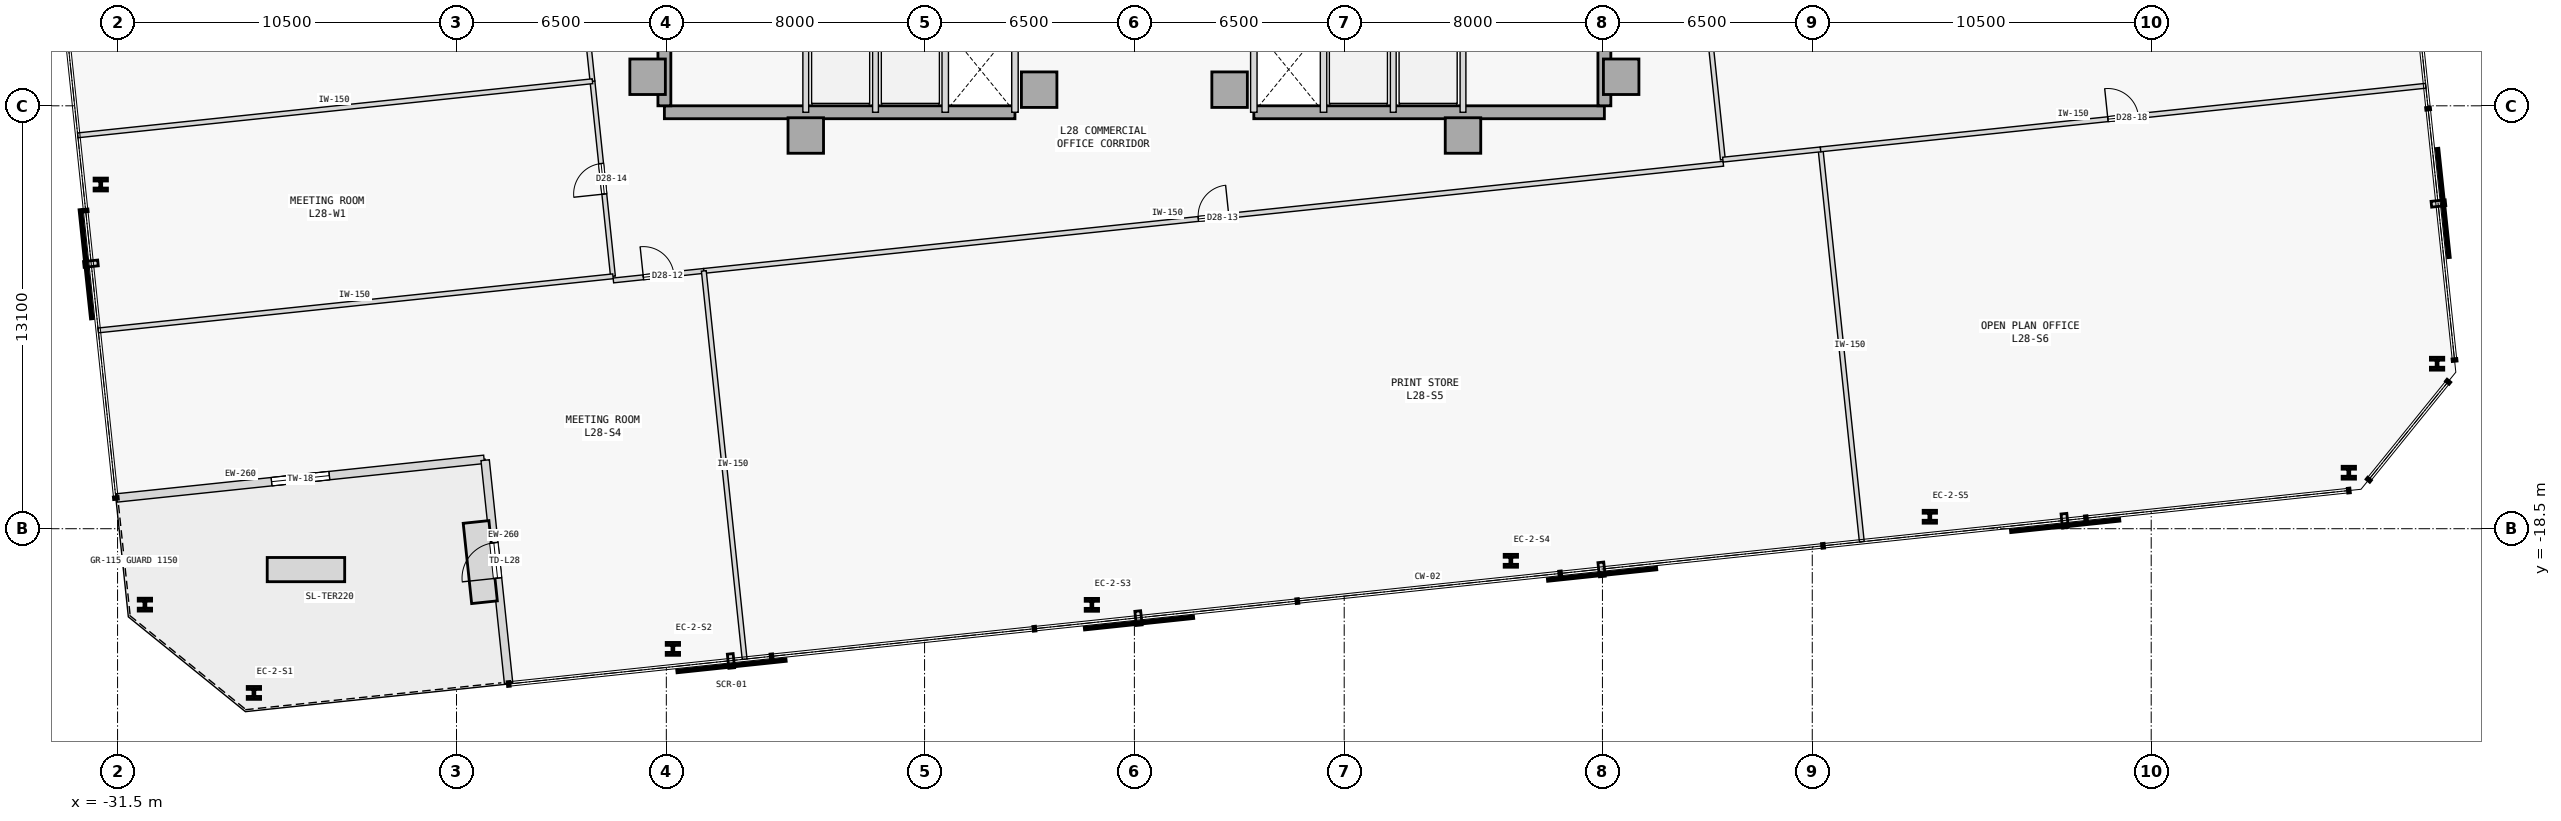
"""IFC4 building model, lengths in metres.
Left out: names, types, materials, properties, quantities, classifications, styles, units other than length and angle.
Written with IfcOpenShell. Run it as: python <this file> out.ifc"""

import sys

from ifc_helpers import new_model, si_unit, direction, frame, frame_2d, origin, origin_2d, place, context, subcontext, project, spatial, rectangle, i_section, extrude, element, fill, save


model = new_model("IFC4")
c1 = context("Model", 3, precision=1e-05, world=origin(), true_north=direction((0.0, 1.0)))
c2 = subcontext(c1, "Body", "Model", "MODEL_VIEW")
j1 = project(units=[si_unit("LENGTHUNIT", "METRE"), si_unit("PLANEANGLEUNIT", "RADIAN")], contexts=[c1])
p1 = place(None, origin())
s1 = spatial("IfcSite", under=j1, at=p1, CompositionType="ELEMENT")
p2 = place(p1, origin())
s2 = spatial("IfcBuilding", under=s1, at=p2, CompositionType="ELEMENT")
p3 = place(p2, frame((0.0, 0.0, 113.3)))
s3 = spatial("IfcBuildingStorey", under=s2, at=p3, CompositionType="ELEMENT", Elevation=113.3)
for number, where, z_axis, x_axis in (
    (1, (-15.08, -4.5, 0.0), (0.0, 0.0, 1.0), (1.0, 0.0, 0.0)),
    (2, (-10.18, -6.32, 0.0), (0.0, 0.0, 1.0), (1.0, 0.0, 0.0)),
    (3, (-2.95, -4.9, 0.0), (0.0, 0.0, 1.0), (1.0, 0.0, 0.0)),
    (4, (15.08, -4.5, 0.0), (0.0, 0.0, 1.0), (1.0, 0.0, 0.0)),
    (5, (10.18, -6.32, 0.0), (0.0, 0.0, 1.0), (1.0, 0.0, 0.0)),
    (6, (2.95, -4.9, 0.0), (0.0, 0.0, 1.0), (1.0, 0.0, 0.0)),
):
    element("IfcColumn", number, at=place(p3, frame(where, z_axis=z_axis, x_axis=x_axis)), inside=s3, PredefinedType="COLUMN", context=c2, shape_type="SweptSolid", body=[
        extrude(rectangle(XDim=1.1, YDim=1.1, at=origin_2d()), origin(), (0.0, 0.0, 1.0), 3.7),
    ])
p4 = place(p3, frame((-14.56, -5.6, 0.0), z_axis=(0.0, 0.0, 1.0), x_axis=(1.0, 0.0, 0.0)))
e7 = element("IfcWall", 7, at=p4, inside=s3, PredefinedType="SHEAR", context=c2, shape_type="SweptSolid", body=[
    extrude(rectangle(XDim=10.86, YDim=0.4, at=frame_2d((5.43, 0.0))), origin(), (0.0, 0.0, 1.0), 3.475),
])
p5 = place(p3, frame((-14.56, -5.4, 0.0), z_axis=(0.0, 0.0, 1.0), x_axis=(0.0, 1.0, 0.0)))
e8 = element("IfcWall", 8, at=p5, inside=s3, PredefinedType="SHEAR", context=c2, shape_type="SweptSolid", body=[
    extrude(rectangle(XDim=10.8, YDim=0.4, at=frame_2d((5.4, 0.0))), origin(), (0.0, 0.0, 1.0), 3.475),
])
p6 = place(p3, frame((3.7, -5.6, 0.0), z_axis=(0.0, 0.0, 1.0), x_axis=(1.0, 0.0, 0.0)))
e9 = element("IfcWall", 9, at=p6, inside=s3, PredefinedType="SHEAR", context=c2, shape_type="SweptSolid", body=[
    extrude(rectangle(XDim=10.86, YDim=0.4, at=frame_2d((5.43, 0.0))), origin(), (0.0, 0.0, 1.0), 3.475),
])
p7 = place(p3, frame((14.56, -5.4, 0.0), z_axis=(0.0, 0.0, 1.0), x_axis=(0.0, 1.0, 0.0)))
e10 = element("IfcWall", 10, at=p7, inside=s3, PredefinedType="SHEAR", context=c2, shape_type="SweptSolid", body=[
    extrude(rectangle(XDim=10.8, YDim=0.4, at=frame_2d((5.4, 0.0))), origin(), (0.0, 0.0, 1.0), 3.475),
])
for number, where, z_axis, x_axis in (
    (11, (-27.276, -23.586, 0.0), (0.0, 0.0, 1.0), (1.0, 0.0, 0.0)),
    (12, (-14.297, -22.222, 0.0), (0.0, 0.0, 1.0), (1.0, 0.0, 0.0)),
    (13, (-1.317, -20.858, 0.0), (0.0, 0.0, 1.0), (1.0, 0.0, 0.0)),
    (14, (11.663, -19.494, 0.0), (0.0, 0.0, 1.0), (1.0, 0.0, 0.0)),
    (15, (24.642, -18.129, 0.0), (0.0, 0.0, 1.0), (1.0, 0.0, 0.0)),
    (16, (37.622, -16.765, 0.0), (0.0, 0.0, 1.0), (1.0, 0.0, 0.0)),
    (17, (40.356, -13.389, 0.0), (0.0, 0.0, 1.0), (1.0, 0.0, 0.0)),
    (18, (-32.021, -7.838, 0.0), (0.0, 0.0, 1.0), (1.0, 0.0, 0.0)),
    (19, (-30.653, -20.852, 0.0), (0.0, 0.0, 1.0), (1.0, 0.0, 0.0)),
):
    element("IfcColumn", number, at=place(p3, frame(where, z_axis=z_axis, x_axis=x_axis)), inside=s3, PredefinedType="COLUMN", context=c2, shape_type="SweptSolid", body=[
        extrude(i_section(OverallWidth=0.413, OverallDepth=0.398, WebThickness=0.056, FlangeThickness=0.089, FilletRadius=0.015, at=origin_2d()), origin(), (0.0, 0.0, 1.0), 3.7),
    ])
p8 = place(p3, frame((-31.523, -17.547, 0.0), z_axis=(0.0, 0.0, 1.0), x_axis=(0.994522045275, 0.104527036989, 0.0)))
e20 = element("IfcWall", 20, at=p8, inside=s3, PredefinedType="STANDARD", context=c2, shape_type="SweptSolid", body=[
    extrude(rectangle(XDim=11.44, YDim=0.26, at=frame_2d((5.72, 0.0))), origin(), (0.0, 0.0, 1.0), 3.475),
])
p9 = place(p8, frame((4.82, 0.0, 0.8)))
e21 = element("IfcOpeningElement", 21, at=p9, cuts=e20, PredefinedType="OPENING", context=c2, shape_type="SweptSolid", body=[
    extrude(rectangle(XDim=1.8, YDim=1.8, at=frame_2d((0.9, 0.9))), frame((0.0, 0.14, 0.0), z_axis=(0.0, -1.0, 0.0), x_axis=(1.0, 0.0, 0.0)), (0.0, 0.0, 1.0), 0.28),
])
p10 = place(p3, frame((-20.113, -16.378, 0.0), z_axis=(0.0, 0.0, 1.0), x_axis=(0.104552933441, -0.994519323145, 0.0)))
e22 = element("IfcWall", 22, at=p10, inside=s3, PredefinedType="STANDARD", context=c2, shape_type="SweptSolid", body=[
    extrude(rectangle(XDim=6.94, YDim=0.26, at=frame_2d((3.47, 0.0))), origin(), (0.0, 0.0, 1.0), 3.475),
])
p11 = place(p10, frame((2.573, 0.0, 0.0)))
e23 = element("IfcOpeningElement", 23, at=p11, cuts=e22, PredefinedType="OPENING", context=c2, shape_type="SweptSolid", body=[
    extrude(rectangle(XDim=1.1, YDim=2.2, at=frame_2d((0.55, 1.1))), frame((0.0, 0.14, 0.0), z_axis=(0.0, -1.0, 0.0), x_axis=(1.0, 0.0, 0.0)), (0.0, 0.0, 1.0), 0.28),
])
for number, where, z_axis, x_axis in (
    (24, (-3.7, -5.6, 0.0), (0.0, 0.0, 1.0), (0.0, 1.0, 0.0)),
    (25, (-5.86, -5.6, 0.0), (0.0, 0.0, 1.0), (0.0, 1.0, 0.0)),
):
    element("IfcWall", number, at=place(p3, frame(where, z_axis=z_axis, x_axis=x_axis)), inside=s3, PredefinedType="STANDARD", context=c2, shape_type="SweptSolid", body=[
        extrude(rectangle(XDim=2.65, YDim=0.2, at=frame_2d((1.325, 0.0))), origin(), (0.0, 0.0, 1.0), 3.475),
    ])
for number, where, z_axis, x_axis in (
    (26, (-10.18, -5.6, 0.0), (0.0, 0.0, 1.0), (0.0, 1.0, 0.0)),
    (27, (-8.02, -5.6, 0.0), (0.0, 0.0, 1.0), (0.0, 1.0, 0.0)),
):
    element("IfcWall", number, at=place(p3, frame(where, z_axis=z_axis, x_axis=x_axis)), inside=s3, PredefinedType="STANDARD", context=c2, shape_type="SweptSolid", body=[
        extrude(rectangle(XDim=2.65, YDim=0.18, at=frame_2d((1.325, 0.0))), origin(), (0.0, 0.0, 1.0), 3.475),
    ])
for number, where, z_axis, x_axis in (
    (28, (3.7, -5.6, 0.0), (0.0, 0.0, 1.0), (0.0, 1.0, 0.0)),
    (29, (5.86, -5.6, 0.0), (0.0, 0.0, 1.0), (0.0, 1.0, 0.0)),
):
    element("IfcWall", number, at=place(p3, frame(where, z_axis=z_axis, x_axis=x_axis)), inside=s3, PredefinedType="STANDARD", context=c2, shape_type="SweptSolid", body=[
        extrude(rectangle(XDim=2.65, YDim=0.2, at=frame_2d((1.325, 0.0))), origin(), (0.0, 0.0, 1.0), 3.475),
    ])
for number, where, z_axis, x_axis in (
    (30, (10.18, -5.6, 0.0), (0.0, 0.0, 1.0), (0.0, 1.0, 0.0)),
    (31, (8.02, -5.6, 0.0), (0.0, 0.0, 1.0), (0.0, 1.0, 0.0)),
):
    element("IfcWall", number, at=place(p3, frame(where, z_axis=z_axis, x_axis=x_axis)), inside=s3, PredefinedType="STANDARD", context=c2, shape_type="SweptSolid", body=[
        extrude(rectangle(XDim=2.65, YDim=0.18, at=frame_2d((1.325, 0.0))), origin(), (0.0, 0.0, 1.0), 3.475),
    ])
p12 = place(p3, frame((-16.14, -10.809, 0.0), z_axis=(0.0, 0.0, 1.0), x_axis=(0.994522535937, 0.104522368483, 0.0)))
e32 = element("IfcWall", 32, at=p12, inside=s3, PredefinedType="PARTITIONING", context=c2, shape_type="SweptSolid", body=[
    extrude(rectangle(XDim=2.817, YDim=0.15, at=frame_2d((1.408, 0.0))), origin(), (0.0, 0.0, 1.0), 3.475),
])
p13 = place(p12, frame((0.934, 0.0, 0.0)))
e33 = element("IfcOpeningElement", 33, at=p13, cuts=e32, PredefinedType="OPENING", context=c2, shape_type="SweptSolid", body=[
    extrude(rectangle(XDim=0.95, YDim=2.15, at=frame_2d((0.475, 1.075))), frame((0.0, 0.085, 0.0), z_axis=(0.0, -1.0, 0.0), x_axis=(1.0, 0.0, 0.0)), (0.0, 0.0, 1.0), 0.17),
])
p14 = place(p3, frame((-13.338, -10.515, 0.0), z_axis=(0.0, 0.0, 1.0), x_axis=(0.994522458216, 0.104523107989, 0.0)))
e34 = element("IfcWall", 34, at=p14, inside=s3, PredefinedType="PARTITIONING", context=c2, shape_type="SweptSolid", body=[
    extrude(rectangle(XDim=31.757, YDim=0.15, at=frame_2d((15.878, 0.0))), origin(), (0.0, 0.0, 1.0), 3.475),
])
p15 = place(p14, frame((15.404, 0.0, 0.0)))
e35 = element("IfcOpeningElement", 35, at=p15, cuts=e34, PredefinedType="OPENING", context=c2, shape_type="SweptSolid", body=[
    extrude(rectangle(XDim=0.95, YDim=2.15, at=frame_2d((0.475, 1.075))), frame((0.0, 0.085, 0.0), z_axis=(0.0, -1.0, 0.0), x_axis=(1.0, 0.0, 0.0)), (0.0, 0.0, 1.0), 0.17),
])
p16 = place(p3, frame((-16.153, -10.682, 0.0), z_axis=(0.0, 0.0, 1.0), x_axis=(-0.104550920346, 0.994519534778, 0.0)))
e36 = element("IfcWall", 36, at=p16, inside=s3, PredefinedType="PARTITIONING", context=c2, shape_type="SweptSolid", body=[
    extrude(rectangle(XDim=6.076, YDim=0.15, at=frame_2d((3.038, 0.0))), origin(), (0.0, 0.0, 1.0), 3.475),
])
p17 = place(p16, frame((2.563, 0.0, 0.0)))
e37 = element("IfcOpeningElement", 37, at=p17, cuts=e36, PredefinedType="OPENING", context=c2, shape_type="SweptSolid", body=[
    extrude(rectangle(XDim=0.95, YDim=2.15, at=frame_2d((0.475, 1.075))), frame((0.0, 0.085, 0.0), z_axis=(0.0, -1.0, 0.0), x_axis=(1.0, 0.0, 0.0)), (0.0, 0.0, 1.0), 0.17),
])
p18 = place(p3, frame((-16.789, -4.639, 0.0), z_axis=(0.0, 0.0, 1.0), x_axis=(-0.104515608009, 0.994523246426, 0.0)))
e38 = element("IfcWall", 38, at=p18, inside=s3, PredefinedType="PARTITIONING", context=c2, shape_type="SweptSolid", body=[
    extrude(rectangle(XDim=11.794, YDim=0.15, at=frame_2d((5.897, 0.0))), origin(), (0.0, 0.0, 1.0), 3.475),
])
p19 = place(p18, frame((5.422, 0.0, 0.0)))
e39 = element("IfcOpeningElement", 39, at=p19, cuts=e38, PredefinedType="OPENING", context=c2, shape_type="SweptSolid", body=[
    extrude(rectangle(XDim=0.95, YDim=2.15, at=frame_2d((0.475, 1.075))), frame((0.0, 0.085, 0.0), z_axis=(0.0, -1.0, 0.0), x_axis=(1.0, 0.0, 0.0)), (0.0, 0.0, 1.0), 0.17),
])
p20 = place(p3, frame((18.231, -7.068, 0.0), z_axis=(0.0, 0.0, 1.0), x_axis=(-0.104536082083, 0.994521094569, 0.0)))
e40 = element("IfcWall", 40, at=p20, inside=s3, PredefinedType="PARTITIONING", context=c2, shape_type="SweptSolid", body=[
    extrude(rectangle(XDim=11.794, YDim=0.15, at=frame_2d((5.897, 0.0))), origin(), (0.0, 0.0, 1.0), 3.475),
])
p21 = place(p20, frame((5.422, 0.0, 0.0)))
e41 = element("IfcOpeningElement", 41, at=p21, cuts=e40, PredefinedType="OPENING", context=c2, shape_type="SweptSolid", body=[
    extrude(rectangle(XDim=0.95, YDim=2.15, at=frame_2d((0.475, 1.075))), frame((0.0, 0.085, 0.0), z_axis=(0.0, -1.0, 0.0), x_axis=(1.0, 0.0, 0.0)), (0.0, 0.0, 1.0), 0.17),
])
p22 = place(p3, frame((-12.074, -22.542, 0.0), z_axis=(0.0, 0.0, 1.0), x_axis=(-0.104515587229, 0.99452324861, 0.0)))
e42 = element("IfcWall", 42, at=p22, inside=s3, PredefinedType="PARTITIONING", context=c2, shape_type="SweptSolid", body=[
    extrude(rectangle(XDim=12.093, YDim=0.15, at=frame_2d((6.046, 0.0))), origin(), (0.0, 0.0, 1.0), 3.475),
])
p23 = place(p3, frame((-32.099, -12.358, 0.0), z_axis=(0.0, 0.0, 1.0), x_axis=(0.994522794159, 0.104519911488, 0.0)))
e43 = element("IfcWall", 43, at=p23, inside=s3, PredefinedType="PARTITIONING", context=c2, shape_type="SweptSolid", body=[
    extrude(rectangle(XDim=16.033, YDim=0.15, at=frame_2d((8.017, 0.0))), origin(), (0.0, 0.0, 1.0), 3.475),
])
p24 = place(p3, frame((22.535, -18.904, 0.0), z_axis=(0.0, 0.0, 1.0), x_axis=(-0.104520477826, 0.99452273464, 0.0)))
e44 = element("IfcWall", 44, at=p24, inside=s3, PredefinedType="PARTITIONING", context=c2, shape_type="SweptSolid", body=[
    extrude(rectangle(XDim=12.221, YDim=0.15, at=frame_2d((6.11, 0.0))), origin(), (0.0, 0.0, 1.0), 3.475),
])
p25 = place(p3, frame((18.231, -7.068, 0.0), z_axis=(0.0, 0.0, 1.0), x_axis=(0.994520828596, 0.104538612428, 0.0)))
e45 = element("IfcWall", 45, at=p25, inside=s3, PredefinedType="PARTITIONING", context=c2, shape_type="SweptSolid", body=[
    extrude(rectangle(XDim=3.043, YDim=0.15, at=frame_2d((1.521, 0.0))), origin(), (0.0, 0.0, 1.0), 3.475),
])
p26 = place(p3, frame((21.258, -6.75, 0.0), z_axis=(0.0, 0.0, 1.0), x_axis=(0.994521409189, 0.104533088851, 0.0)))
e46 = element("IfcWall", 46, at=p26, inside=s3, PredefinedType="PARTITIONING", context=c2, shape_type="SweptSolid", body=[
    extrude(rectangle(XDim=18.85, YDim=0.15, at=frame_2d((9.425, 0.0))), origin(), (0.0, 0.0, 1.0), 3.475),
])
p27 = place(p26, frame((8.95, 0.0, 0.0)))
e47 = element("IfcOpeningElement", 47, at=p27, cuts=e46, PredefinedType="OPENING", context=c2, shape_type="SweptSolid", body=[
    extrude(rectangle(XDim=0.95, YDim=2.15, at=frame_2d((0.475, 1.075))), frame((0.0, 0.085, 0.0), z_axis=(0.0, -1.0, 0.0), x_axis=(1.0, 0.0, 0.0)), (0.0, 0.0, 1.0), 0.17),
])
p28 = place(p3, frame((-32.734, -6.315, 0.0), z_axis=(0.0, 0.0, 1.0), x_axis=(0.994522627807, 0.104521494347, 0.0)))
e48 = element("IfcWall", 48, at=p28, inside=s3, PredefinedType="PARTITIONING", context=c2, shape_type="SweptSolid", body=[
    extrude(rectangle(XDim=16.033, YDim=0.15, at=frame_2d((8.017, 0.0))), origin(), (0.0, 0.0, 1.0), 3.475),
])
p29 = place(p9, origin())
e49 = element("IfcWindow", 49, at=p29, inside=s3, PartitioningType="SINGLE_PANEL", PredefinedType="WINDOW", context=c2, shape_type="SweptSolid", body=[
    extrude(rectangle(XDim=1.8, YDim=1.8, at=frame_2d((0.9, 0.9))), frame((0.0, 0.03, 0.0), z_axis=(0.0, -1.0, 0.0), x_axis=(1.0, 0.0, 0.0)), (0.0, 0.0, 1.0), 0.06),
])
fill(e21, e49)
p30 = place(p11, frame((1.1, 0.0, 0.0), z_axis=(0.0, 0.0, 1.0), x_axis=(-1.0, 0.0, 0.0)))
e50 = element("IfcDoor", 50, at=p30, inside=s3, OperationType="SINGLE_SWING_RIGHT", PredefinedType="DOOR", context=c2, shape_type="SweptSolid", body=[
    extrude(rectangle(XDim=1.1, YDim=2.2, at=frame_2d((0.55, 1.1))), frame((0.0, 0.025, 0.0), z_axis=(0.0, -1.0, 0.0), x_axis=(1.0, 0.0, 0.0)), (0.0, 0.0, 1.0), 0.05),
])
fill(e23, e50)
p31 = place(p13, origin())
e51 = element("IfcDoor", 51, at=p31, inside=s3, OperationType="SINGLE_SWING_LEFT", PredefinedType="DOOR", context=c2, shape_type="SweptSolid", body=[
    extrude(rectangle(XDim=0.95, YDim=2.15, at=frame_2d((0.475, 1.075))), frame((0.0, 0.025, 0.0), z_axis=(0.0, -1.0, 0.0), x_axis=(1.0, 0.0, 0.0)), (0.0, 0.0, 1.0), 0.05),
])
fill(e33, e51)
p32 = place(p15, origin())
e52 = element("IfcDoor", 52, at=p32, inside=s3, OperationType="SINGLE_SWING_RIGHT", PredefinedType="DOOR", context=c2, shape_type="SweptSolid", body=[
    extrude(rectangle(XDim=0.95, YDim=2.15, at=frame_2d((0.475, 1.075))), frame((0.0, 0.025, 0.0), z_axis=(0.0, -1.0, 0.0), x_axis=(1.0, 0.0, 0.0)), (0.0, 0.0, 1.0), 0.05),
])
fill(e35, e52)
p33 = place(p17, origin())
e53 = element("IfcDoor", 53, at=p33, inside=s3, OperationType="SINGLE_SWING_LEFT", PredefinedType="DOOR", context=c2, shape_type="SweptSolid", body=[
    extrude(rectangle(XDim=0.95, YDim=2.15, at=frame_2d((0.475, 1.075))), frame((0.0, 0.025, 0.0), z_axis=(0.0, -1.0, 0.0), x_axis=(1.0, 0.0, 0.0)), (0.0, 0.0, 1.0), 0.05),
])
fill(e37, e53)
p34 = place(p27, origin())
e54 = element("IfcDoor", 54, at=p34, inside=s3, OperationType="SINGLE_SWING_LEFT", PredefinedType="DOOR", context=c2, shape_type="SweptSolid", body=[
    extrude(rectangle(XDim=0.95, YDim=2.15, at=frame_2d((0.475, 1.075))), frame((0.0, 0.025, 0.0), z_axis=(0.0, -1.0, 0.0), x_axis=(1.0, 0.0, 0.0)), (0.0, 0.0, 1.0), 0.05),
])
fill(e47, e54)
save(model, sys.argv[1])
